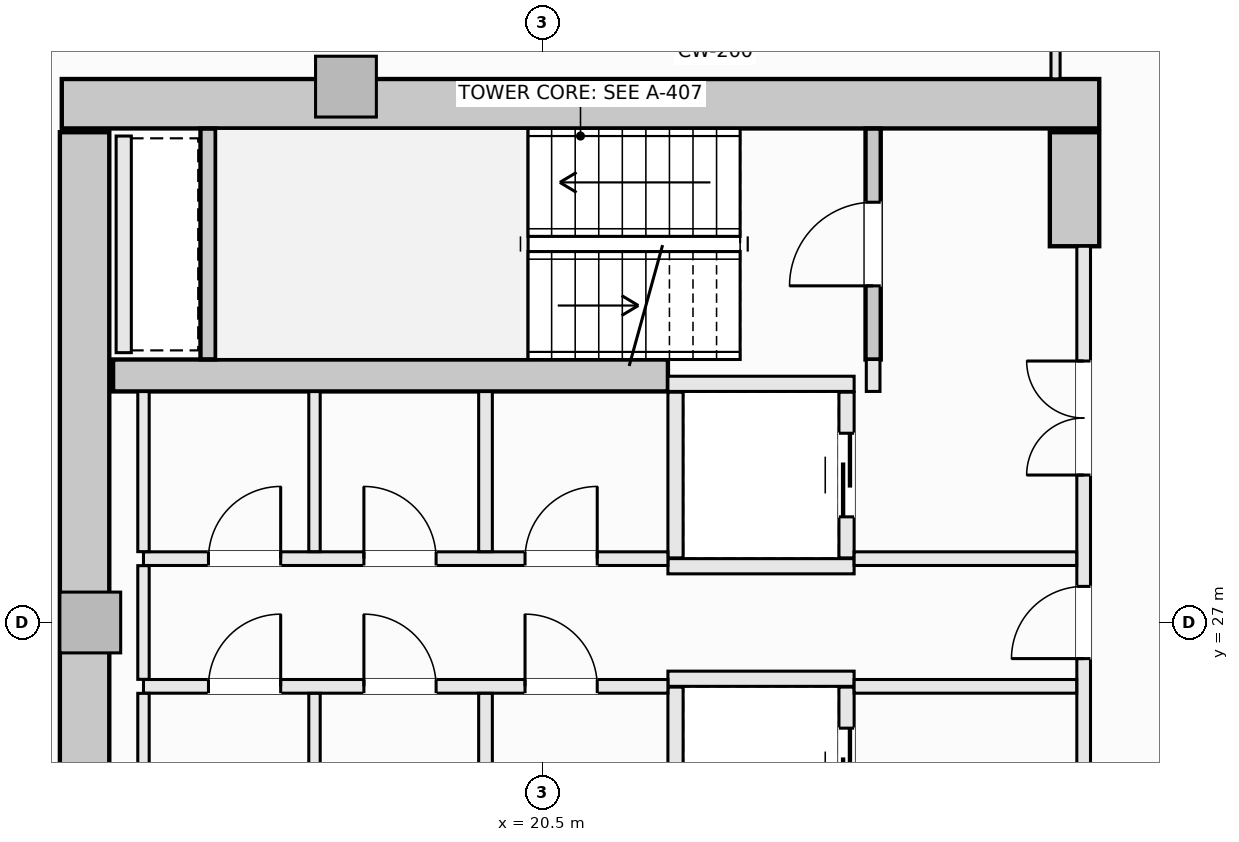
"""IFC4 building model, lengths in metres.
Left out: names, types, materials, properties, quantities, classifications, styles, units other than length and angle.
Written with IfcOpenShell. Run it as: python <this file> out.ifc"""

import sys

from ifc_helpers import new_model, si_unit, direction, frame, frame_2d, origin, origin_2d, place, context, subcontext, project, spatial, rectangle, extrude, element, fill, save


model = new_model("IFC4")
c1 = context("Model", 3, precision=1e-05, world=origin(), true_north=direction((0.0, 1.0)))
c2 = subcontext(c1, "Body", "Model", "MODEL_VIEW")
j1 = project(units=[si_unit("LENGTHUNIT", "METRE"), si_unit("PLANEANGLEUNIT", "RADIAN")], contexts=[c1])
p1 = place(None, origin())
s1 = spatial("IfcSite", under=j1, at=p1, CompositionType="ELEMENT")
p2 = place(p1, origin())
s2 = spatial("IfcBuilding", under=s1, at=p2, CompositionType="ELEMENT")
p3 = place(p2, frame((0.0, 0.0, 173.3)))
s3 = spatial("IfcBuildingStorey", under=s2, at=p3, CompositionType="ELEMENT", Elevation=173.3)
p4 = place(p3, frame((14.175, 33.825, -0.27), z_axis=(0.0, 0.0, 1.0), x_axis=(1.0, 0.0, 0.0)))
e1 = element("IfcWall", 1, at=p4, inside=s3, PredefinedType="SHEAR", context=c2, shape_type="SweptSolid", body=[
    extrude(rectangle(XDim=13.65, YDim=0.65, at=frame_2d((6.825, 0.0))), origin(), (0.0, 0.0, 1.0), 3.4),
])
p5 = place(p3, frame((14.475, 20.55, -0.27), z_axis=(0.0, 0.0, 1.0), x_axis=(0.0, 1.0, 0.0)))
e2 = element("IfcWall", 2, at=p5, inside=s3, PredefinedType="SHEAR", context=c2, shape_type="SweptSolid", body=[
    extrude(rectangle(XDim=12.9, YDim=0.65, at=frame_2d((6.45, 0.0))), origin(), (0.0, 0.0, 1.0), 3.4),
])
p6 = place(p3, frame((27.5, 31.95, -0.27), z_axis=(0.0, 0.0, 1.0), x_axis=(0.0, 1.0, 0.0)))
e3 = element("IfcWall", 3, at=p6, inside=s3, PredefinedType="SHEAR", context=c2, shape_type="SweptSolid", body=[
    extrude(rectangle(XDim=1.5, YDim=0.65, at=frame_2d((0.75, 0.0))), origin(), (0.0, 0.0, 1.0), 3.4),
])
p7 = place(p3, frame((14.85, 30.25, -0.27), z_axis=(0.0, 0.0, 1.0), x_axis=(1.0, 0.0, 0.0)))
e4 = element("IfcWall", 4, at=p7, inside=s3, PredefinedType="SHEAR", context=c2, shape_type="SweptSolid", body=[
    extrude(rectangle(XDim=7.3, YDim=0.42, at=frame_2d((3.65, 0.0))), origin(), (0.0, 0.0, 1.0), 3.4),
])
for number, where, z_axis, x_axis in (
    (5, (17.914, 34.05, -0.27), (0.0, 0.0, 1.0), (1.0, 0.0, 0.0)),
    (6, (14.55, 27.0, -0.27), (0.0, 0.0, 1.0), (1.0, 0.0, 0.0)),
):
    element("IfcColumn", number, at=place(p3, frame(where, z_axis=z_axis, x_axis=x_axis)), inside=s3, PredefinedType="PILASTER", context=c2, shape_type="SweptSolid", body=[
        extrude(rectangle(XDim=0.8, YDim=0.8, at=origin_2d()), origin(), (0.0, 0.0, 1.0), 3.4),
    ])
p8 = place(p3, frame((24.85, 30.46, -0.27), z_axis=(0.0, 0.0, 1.0), x_axis=(0.0, 1.0, 0.0)))
e7 = element("IfcWall", 7, at=p8, inside=s3, PredefinedType="SHEAR", context=c2, shape_type="SweptSolid", body=[
    extrude(rectangle(XDim=3.038, YDim=0.2, at=frame_2d((1.519, 0.0))), origin(), (0.0, 0.0, 1.0), 3.4),
])
p9 = place(p8, frame((0.969, 0.0, 0.27)))
e8 = element("IfcOpeningElement", 8, at=p9, cuts=e7, PredefinedType="OPENING", context=c2, shape_type="SweptSolid", body=[
    extrude(rectangle(XDim=1.1, YDim=2.15, at=frame_2d((0.55, 1.075))), frame((0.0, 0.11, 0.0), z_axis=(0.0, -1.0, 0.0), x_axis=(1.0, 0.0, 0.0)), (0.0, 0.0, 1.0), 0.22),
])
p10 = place(p3, frame((16.1, 30.462, -0.27), z_axis=(0.0, 0.0, 1.0), x_axis=(0.0, 1.0, 0.0)))
e9 = element("IfcWall", 9, at=p10, inside=s3, PredefinedType="SHEAR", context=c2, shape_type="SweptSolid", body=[
    extrude(rectangle(XDim=3.036, YDim=0.2, at=frame_2d((1.518, 0.0))), origin(), (0.0, 0.0, 1.0), 3.4),
])
for number, where, z_axis, x_axis in (
    (10, (22.15, 30.14, 0.0), (0.0, 0.0, 1.0), (1.0, 0.0, 0.0)),
    (11, (22.15, 27.74, 0.0), (0.0, 0.0, 1.0), (1.0, 0.0, 0.0)),
):
    element("IfcWall", number, at=place(p3, frame(where, z_axis=z_axis, x_axis=x_axis)), inside=s3, PredefinedType="SOLIDWALL", context=c2, shape_type="SweptSolid", body=[
        extrude(rectangle(XDim=2.45, YDim=0.2, at=frame_2d((1.225, 0.0))), origin(), (0.0, 0.0, 1.0), 3.13),
    ])
p11 = place(p3, frame((22.25, 27.85, 0.0), z_axis=(0.0, 0.0, 1.0), x_axis=(0.0, 1.0, 0.0)))
e12 = element("IfcWall", 12, at=p11, inside=s3, PredefinedType="SOLIDWALL", context=c2, shape_type="SweptSolid", body=[
    extrude(rectangle(XDim=2.18, YDim=0.2, at=frame_2d((1.09, 0.0))), origin(), (0.0, 0.0, 1.0), 3.13),
])
p12 = place(p3, frame((24.5, 27.85, 0.0), z_axis=(0.0, 0.0, 1.0), x_axis=(0.0, 1.0, 0.0)))
e13 = element("IfcWall", 13, at=p12, inside=s3, PredefinedType="SOLIDWALL", context=c2, shape_type="SweptSolid", body=[
    extrude(rectangle(XDim=2.18, YDim=0.2, at=frame_2d((1.09, 0.0))), origin(), (0.0, 0.0, 1.0), 3.13),
])
p13 = place(p12, frame((0.54, 0.0, 0.0)))
e14 = element("IfcOpeningElement", 14, at=p13, cuts=e13, PredefinedType="OPENING", context=c2, shape_type="SweptSolid", body=[
    extrude(rectangle(XDim=1.1, YDim=2.2, at=frame_2d((0.55, 1.1))), frame((0.0, 0.11, 0.0), z_axis=(0.0, -1.0, 0.0), x_axis=(1.0, 0.0, 0.0)), (0.0, 0.0, 1.0), 0.22),
])
p14 = place(p3, frame((22.15, 26.26, 0.0), z_axis=(0.0, 0.0, 1.0), x_axis=(1.0, 0.0, 0.0)))
e15 = element("IfcWall", 15, at=p14, inside=s3, PredefinedType="SOLIDWALL", context=c2, shape_type="SweptSolid", body=[
    extrude(rectangle(XDim=2.45, YDim=0.2, at=frame_2d((1.225, 0.0))), origin(), (0.0, 0.0, 1.0), 3.13),
])
p15 = place(p3, frame((22.25, 23.97, 0.0), z_axis=(0.0, 0.0, 1.0), x_axis=(0.0, 1.0, 0.0)))
e16 = element("IfcWall", 16, at=p15, inside=s3, PredefinedType="SOLIDWALL", context=c2, shape_type="SweptSolid", body=[
    extrude(rectangle(XDim=2.18, YDim=0.2, at=frame_2d((1.09, 0.0))), origin(), (0.0, 0.0, 1.0), 3.13),
])
p16 = place(p3, frame((24.5, 23.97, 0.0), z_axis=(0.0, 0.0, 1.0), x_axis=(0.0, 1.0, 0.0)))
e17 = element("IfcWall", 17, at=p16, inside=s3, PredefinedType="SOLIDWALL", context=c2, shape_type="SweptSolid", body=[
    extrude(rectangle(XDim=2.18, YDim=0.2, at=frame_2d((1.09, 0.0))), origin(), (0.0, 0.0, 1.0), 3.13),
])
p17 = place(p16, frame((0.54, 0.0, 0.0)))
e18 = element("IfcOpeningElement", 18, at=p17, cuts=e17, PredefinedType="OPENING", context=c2, shape_type="SweptSolid", body=[
    extrude(rectangle(XDim=1.1, YDim=2.2, at=frame_2d((0.55, 1.1))), frame((0.0, 0.11, 0.0), z_axis=(0.0, -1.0, 0.0), x_axis=(1.0, 0.0, 0.0)), (0.0, 0.0, 1.0), 0.22),
])
p18 = place(p3, frame((14.99, 30.55, 0.0), z_axis=(0.0, 0.0, 1.0), x_axis=(0.0, 1.0, 0.0)))
e19 = element("IfcWall", 19, at=p18, inside=s3, PredefinedType="SOLIDWALL", context=c2, shape_type="SweptSolid", body=[
    extrude(rectangle(XDim=2.85, YDim=0.2, at=frame_2d((1.425, 0.0))), origin(), (0.0, 0.0, 1.0), 3.13),
])
p19 = place(p3, frame((24.85, 30.04, 0.0), z_axis=(0.0, 0.0, 1.0), x_axis=(0.0, 1.0, 0.0)))
e20 = element("IfcWall", 20, at=p19, inside=s3, PredefinedType="SOLIDWALL", context=c2, shape_type="SweptSolid", body=[
    extrude(rectangle(XDim=0.42, YDim=0.18, at=frame_2d((0.21, 0.0))), origin(), (0.0, 0.0, 1.0), 3.13),
])
p20 = place(p3, frame((27.62, 22.05, 0.0), z_axis=(0.0, 0.0, 1.0), x_axis=(0.0, 1.0, 0.0)))
e21 = element("IfcWall", 21, at=p20, inside=s3, PredefinedType="SOLIDWALL", context=c2, shape_type="SweptSolid", body=[
    extrude(rectangle(XDim=9.9, YDim=0.18, at=frame_2d((4.95, 0.0))), origin(), (0.0, 0.0, 1.0), 3.13),
])
p21 = place(p20, frame((4.475, 0.0, 0.0)))
e22 = element("IfcOpeningElement", 22, at=p21, cuts=e21, PredefinedType="OPENING", context=c2, shape_type="SweptSolid", body=[
    extrude(rectangle(XDim=0.95, YDim=2.1, at=frame_2d((0.475, 1.05))), frame((0.0, 0.1, 0.0), z_axis=(0.0, -1.0, 0.0), x_axis=(1.0, 0.0, 0.0)), (0.0, 0.0, 1.0), 0.2),
])
p22 = place(p20, frame((6.89, 0.0, 0.0)))
e23 = element("IfcOpeningElement", 23, at=p22, cuts=e21, PredefinedType="OPENING", context=c2, shape_type="SweptSolid", body=[
    extrude(rectangle(XDim=1.5, YDim=2.2, at=frame_2d((0.75, 1.1))), frame((0.0, 0.1, 0.0), z_axis=(0.0, -1.0, 0.0), x_axis=(1.0, 0.0, 0.0)), (0.0, 0.0, 1.0), 0.2),
])
p23 = place(p20, frame((1.51, 0.0, 0.0)))
e24 = element("IfcOpeningElement", 24, at=p23, cuts=e21, PredefinedType="OPENING", context=c2, shape_type="SweptSolid", body=[
    extrude(rectangle(XDim=1.5, YDim=2.2, at=frame_2d((0.75, 1.1))), frame((0.0, 0.1, 0.0), z_axis=(0.0, -1.0, 0.0), x_axis=(1.0, 0.0, 0.0)), (0.0, 0.0, 1.0), 0.2),
])
p24 = place(p3, frame((15.25, 27.84, 0.0), z_axis=(0.0, 0.0, 1.0), x_axis=(1.0, 0.0, 0.0)))
e25 = element("IfcWall", 25, at=p24, inside=s3, PredefinedType="SOLIDWALL", context=c2, shape_type="SweptSolid", body=[
    extrude(rectangle(XDim=6.9, YDim=0.18, at=frame_2d((3.45, 0.0))), origin(), (0.0, 0.0, 1.0), 3.13),
])
p25 = place(p24, frame((5.02, 0.0, 0.0)))
e26 = element("IfcOpeningElement", 26, at=p25, cuts=e25, PredefinedType="OPENING", context=c2, shape_type="SweptSolid", body=[
    extrude(rectangle(XDim=0.95, YDim=2.1, at=frame_2d((0.475, 1.05))), frame((0.0, 0.1, 0.0), z_axis=(0.0, -1.0, 0.0), x_axis=(1.0, 0.0, 0.0)), (0.0, 0.0, 1.0), 0.2),
])
p26 = place(p24, frame((0.855, 0.0, 0.0)))
e27 = element("IfcOpeningElement", 27, at=p26, cuts=e25, PredefinedType="OPENING", context=c2, shape_type="SweptSolid", body=[
    extrude(rectangle(XDim=0.95, YDim=2.1, at=frame_2d((0.475, 1.05))), frame((0.0, 0.1, 0.0), z_axis=(0.0, -1.0, 0.0), x_axis=(1.0, 0.0, 0.0)), (0.0, 0.0, 1.0), 0.2),
])
p27 = place(p24, frame((2.9, 0.0, 0.0)))
e28 = element("IfcOpeningElement", 28, at=p27, cuts=e25, PredefinedType="OPENING", context=c2, shape_type="SweptSolid", body=[
    extrude(rectangle(XDim=0.95, YDim=2.1, at=frame_2d((0.475, 1.05))), frame((0.0, 0.1, 0.0), z_axis=(0.0, -1.0, 0.0), x_axis=(1.0, 0.0, 0.0)), (0.0, 0.0, 1.0), 0.2),
])
p28 = place(p3, frame((24.6, 27.84, 0.0), z_axis=(0.0, 0.0, 1.0), x_axis=(1.0, 0.0, 0.0)))
e29 = element("IfcWall", 29, at=p28, inside=s3, PredefinedType="SOLIDWALL", context=c2, shape_type="SweptSolid", body=[
    extrude(rectangle(XDim=2.928, YDim=0.18, at=frame_2d((1.464, 0.0))), origin(), (0.0, 0.0, 1.0), 3.13),
])
p29 = place(p3, frame((15.25, 26.16, 0.0), z_axis=(0.0, 0.0, 1.0), x_axis=(1.0, 0.0, 0.0)))
e30 = element("IfcWall", 30, at=p29, inside=s3, PredefinedType="SOLIDWALL", context=c2, shape_type="SweptSolid", body=[
    extrude(rectangle(XDim=6.9, YDim=0.18, at=frame_2d((3.45, 0.0))), origin(), (0.0, 0.0, 1.0), 3.13),
])
p30 = place(p29, frame((5.02, 0.0, 0.0)))
e31 = element("IfcOpeningElement", 31, at=p30, cuts=e30, PredefinedType="OPENING", context=c2, shape_type="SweptSolid", body=[
    extrude(rectangle(XDim=0.95, YDim=2.1, at=frame_2d((0.475, 1.05))), frame((0.0, 0.1, 0.0), z_axis=(0.0, -1.0, 0.0), x_axis=(1.0, 0.0, 0.0)), (0.0, 0.0, 1.0), 0.2),
])
p31 = place(p29, frame((0.855, 0.0, 0.0)))
e32 = element("IfcOpeningElement", 32, at=p31, cuts=e30, PredefinedType="OPENING", context=c2, shape_type="SweptSolid", body=[
    extrude(rectangle(XDim=0.95, YDim=2.1, at=frame_2d((0.475, 1.05))), frame((0.0, 0.1, 0.0), z_axis=(0.0, -1.0, 0.0), x_axis=(1.0, 0.0, 0.0)), (0.0, 0.0, 1.0), 0.2),
])
p32 = place(p29, frame((2.9, 0.0, 0.0)))
e33 = element("IfcOpeningElement", 33, at=p32, cuts=e30, PredefinedType="OPENING", context=c2, shape_type="SweptSolid", body=[
    extrude(rectangle(XDim=0.95, YDim=2.1, at=frame_2d((0.475, 1.05))), frame((0.0, 0.1, 0.0), z_axis=(0.0, -1.0, 0.0), x_axis=(1.0, 0.0, 0.0)), (0.0, 0.0, 1.0), 0.2),
])
p33 = place(p3, frame((24.6, 26.16, 0.0), z_axis=(0.0, 0.0, 1.0), x_axis=(1.0, 0.0, 0.0)))
e34 = element("IfcWall", 34, at=p33, inside=s3, PredefinedType="SOLIDWALL", context=c2, shape_type="SweptSolid", body=[
    extrude(rectangle(XDim=2.928, YDim=0.18, at=frame_2d((1.464, 0.0))), origin(), (0.0, 0.0, 1.0), 3.13),
])
p34 = place(p3, frame((15.25, 23.962, 0.0), z_axis=(0.0, 0.0, 1.0), x_axis=(0.0, 1.0, 0.0)))
e35 = element("IfcWall", 35, at=p34, inside=s3, PredefinedType="PARTITIONING", context=c2, shape_type="SweptSolid", body=[
    extrude(rectangle(XDim=2.106, YDim=0.15, at=frame_2d((1.053, 0.0))), origin(), (0.0, 0.0, 1.0), 3.13),
])
p35 = place(p3, frame((15.25, 26.252, 0.0), z_axis=(0.0, 0.0, 1.0), x_axis=(0.0, 1.0, 0.0)))
e36 = element("IfcWall", 36, at=p35, inside=s3, PredefinedType="PARTITIONING", context=c2, shape_type="SweptSolid", body=[
    extrude(rectangle(XDim=1.496, YDim=0.15, at=frame_2d((0.748, 0.0))), origin(), (0.0, 0.0, 1.0), 3.13),
])
p36 = place(p3, frame((15.25, 27.932, 0.0), z_axis=(0.0, 0.0, 1.0), x_axis=(0.0, 1.0, 0.0)))
e37 = element("IfcWall", 37, at=p36, inside=s3, PredefinedType="PARTITIONING", context=c2, shape_type="SweptSolid", body=[
    extrude(rectangle(XDim=2.106, YDim=0.15, at=frame_2d((1.053, 0.0))), origin(), (0.0, 0.0, 1.0), 3.13),
])
for number, where, z_axis, x_axis in (
    (38, (19.75, 23.962, 0.0), (0.0, 0.0, 1.0), (0.0, 1.0, 0.0)),
    (39, (19.75, 27.932, 0.0), (0.0, 0.0, 1.0), (0.0, 1.0, 0.0)),
):
    element("IfcWall", number, at=place(p3, frame(where, z_axis=z_axis, x_axis=x_axis)), inside=s3, PredefinedType="SOLIDWALL", context=c2, shape_type="SweptSolid", body=[
        extrude(rectangle(XDim=2.106, YDim=0.18, at=frame_2d((1.053, 0.0))), origin(), (0.0, 0.0, 1.0), 3.13),
    ])
for number, where, z_axis, x_axis in (
    (40, (17.5, 23.962, 0.0), (0.0, 0.0, 1.0), (0.0, 1.0, 0.0)),
    (41, (17.5, 27.932, 0.0), (0.0, 0.0, 1.0), (0.0, 1.0, 0.0)),
):
    element("IfcWall", number, at=place(p3, frame(where, z_axis=z_axis, x_axis=x_axis)), inside=s3, PredefinedType="PARTITIONING", context=c2, shape_type="SweptSolid", body=[
        extrude(rectangle(XDim=2.106, YDim=0.15, at=frame_2d((1.053, 0.0))), origin(), (0.0, 0.0, 1.0), 3.13),
    ])
p37 = place(p3, frame((27.25, 34.152, 0.0), z_axis=(0.0, 0.0, 1.0), x_axis=(0.0, 1.0, 0.0)))
e42 = element("IfcWall", 42, at=p37, inside=s3, PredefinedType="PARTITIONING", context=c2, shape_type="SweptSolid", body=[
    extrude(rectangle(XDim=0.806, YDim=0.12, at=frame_2d((0.403, 0.0))), origin(), (0.0, 0.0, 1.0), 3.13),
])
p38 = place(p9, origin())
e43 = element("IfcDoor", 43, at=p38, inside=s3, OperationType="SINGLE_SWING_LEFT", PredefinedType="DOOR", context=c2, shape_type="SweptSolid", body=[
    extrude(rectangle(XDim=1.1, YDim=2.15, at=frame_2d((0.55, 1.075))), frame((0.0, 0.025, 0.0), z_axis=(0.0, -1.0, 0.0), x_axis=(1.0, 0.0, 0.0)), (0.0, 0.0, 1.0), 0.05),
])
fill(e8, e43)
p39 = place(p13, origin())
e44 = element("IfcDoor", 44, at=p39, inside=s3, OperationType="SLIDING_TO_LEFT", PredefinedType="DOOR", context=c2, shape_type="SweptSolid", body=[
    extrude(rectangle(XDim=1.1, YDim=2.2, at=frame_2d((0.55, 1.1))), frame((0.0, 0.025, 0.0), z_axis=(0.0, -1.0, 0.0), x_axis=(1.0, 0.0, 0.0)), (0.0, 0.0, 1.0), 0.05),
])
fill(e14, e44)
p40 = place(p17, origin())
e45 = element("IfcDoor", 45, at=p40, inside=s3, OperationType="SLIDING_TO_LEFT", PredefinedType="DOOR", context=c2, shape_type="SweptSolid", body=[
    extrude(rectangle(XDim=1.1, YDim=2.2, at=frame_2d((0.55, 1.1))), frame((0.0, 0.025, 0.0), z_axis=(0.0, -1.0, 0.0), x_axis=(1.0, 0.0, 0.0)), (0.0, 0.0, 1.0), 0.05),
])
fill(e18, e45)
p41 = place(p21, origin())
e46 = element("IfcDoor", 46, at=p41, inside=s3, OperationType="SINGLE_SWING_LEFT", PredefinedType="DOOR", context=c2, shape_type="SweptSolid", body=[
    extrude(rectangle(XDim=0.95, YDim=2.1, at=frame_2d((0.475, 1.05))), frame((0.0, 0.025, 0.0), z_axis=(0.0, -1.0, 0.0), x_axis=(1.0, 0.0, 0.0)), (0.0, 0.0, 1.0), 0.05),
])
fill(e22, e46)
p42 = place(p22, origin())
e47 = element("IfcDoor", 47, at=p42, inside=s3, OperationType="DOUBLE_DOOR_SINGLE_SWING", PredefinedType="DOOR", context=c2, shape_type="SweptSolid", body=[
    extrude(rectangle(XDim=1.5, YDim=2.2, at=frame_2d((0.75, 1.1))), frame((0.0, 0.025, 0.0), z_axis=(0.0, -1.0, 0.0), x_axis=(1.0, 0.0, 0.0)), (0.0, 0.0, 1.0), 0.05),
])
fill(e23, e47)
p43 = place(p25, origin())
e48 = element("IfcDoor", 48, at=p43, inside=s3, OperationType="SINGLE_SWING_RIGHT", PredefinedType="DOOR", context=c2, shape_type="SweptSolid", body=[
    extrude(rectangle(XDim=0.95, YDim=2.1, at=frame_2d((0.475, 1.05))), frame((0.0, 0.025, 0.0), z_axis=(0.0, -1.0, 0.0), x_axis=(1.0, 0.0, 0.0)), (0.0, 0.0, 1.0), 0.05),
])
fill(e26, e48)
p44 = place(p30, origin())
e49 = element("IfcDoor", 49, at=p44, inside=s3, OperationType="SINGLE_SWING_LEFT", PredefinedType="DOOR", context=c2, shape_type="SweptSolid", body=[
    extrude(rectangle(XDim=0.95, YDim=2.1, at=frame_2d((0.475, 1.05))), frame((0.0, 0.025, 0.0), z_axis=(0.0, -1.0, 0.0), x_axis=(1.0, 0.0, 0.0)), (0.0, 0.0, 1.0), 0.05),
])
fill(e31, e49)
p45 = place(p26, origin())
e50 = element("IfcDoor", 50, at=p45, inside=s3, OperationType="SINGLE_SWING_RIGHT", PredefinedType="DOOR", context=c2, shape_type="SweptSolid", body=[
    extrude(rectangle(XDim=0.95, YDim=2.1, at=frame_2d((0.475, 1.05))), frame((0.0, 0.025, 0.0), z_axis=(0.0, -1.0, 0.0), x_axis=(1.0, 0.0, 0.0)), (0.0, 0.0, 1.0), 0.05),
])
fill(e27, e50)
p46 = place(p27, origin())
e51 = element("IfcDoor", 51, at=p46, inside=s3, OperationType="SINGLE_SWING_LEFT", PredefinedType="DOOR", context=c2, shape_type="SweptSolid", body=[
    extrude(rectangle(XDim=0.95, YDim=2.1, at=frame_2d((0.475, 1.05))), frame((0.0, 0.025, 0.0), z_axis=(0.0, -1.0, 0.0), x_axis=(1.0, 0.0, 0.0)), (0.0, 0.0, 1.0), 0.05),
])
fill(e28, e51)
p47 = place(p31, origin())
e52 = element("IfcDoor", 52, at=p47, inside=s3, OperationType="SINGLE_SWING_RIGHT", PredefinedType="DOOR", context=c2, shape_type="SweptSolid", body=[
    extrude(rectangle(XDim=0.95, YDim=2.1, at=frame_2d((0.475, 1.05))), frame((0.0, 0.025, 0.0), z_axis=(0.0, -1.0, 0.0), x_axis=(1.0, 0.0, 0.0)), (0.0, 0.0, 1.0), 0.05),
])
fill(e32, e52)
p48 = place(p32, origin())
e53 = element("IfcDoor", 53, at=p48, inside=s3, OperationType="SINGLE_SWING_LEFT", PredefinedType="DOOR", context=c2, shape_type="SweptSolid", body=[
    extrude(rectangle(XDim=0.95, YDim=2.1, at=frame_2d((0.475, 1.05))), frame((0.0, 0.025, 0.0), z_axis=(0.0, -1.0, 0.0), x_axis=(1.0, 0.0, 0.0)), (0.0, 0.0, 1.0), 0.05),
])
fill(e33, e53)
save(model, sys.argv[1])
